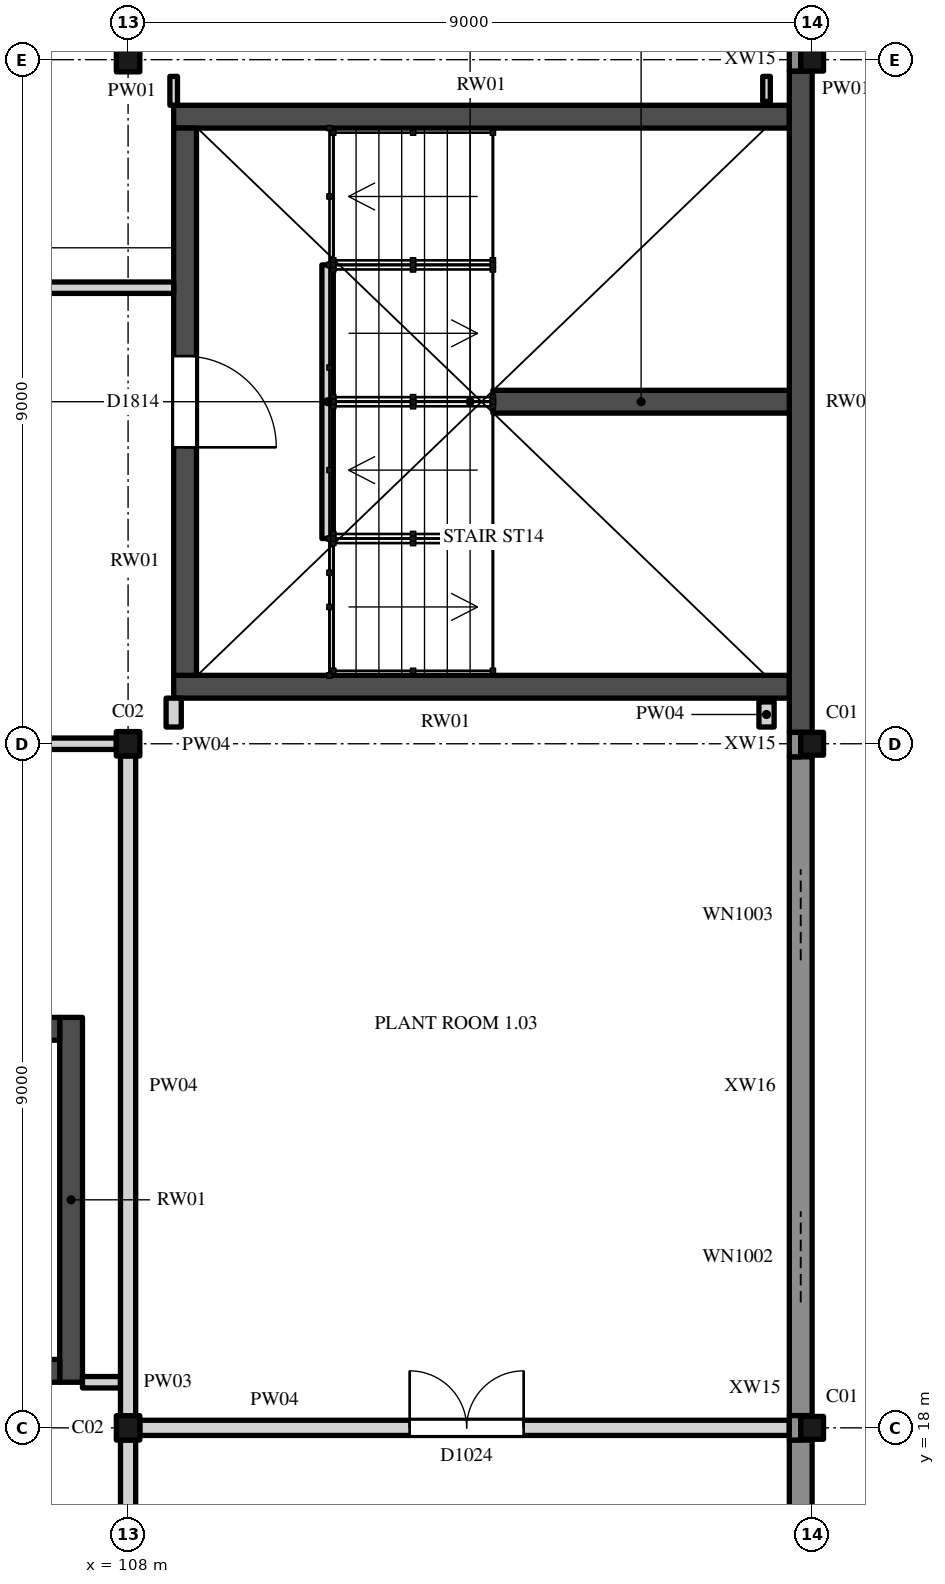
"""IFC4 building model, lengths in metres.
Left out: names, types, materials, properties, quantities, classifications, styles, units other than length and angle.
Written with IfcOpenShell. Run it as: python <this file> out.ifc"""

import sys

from ifc_helpers import new_model, si_unit, direction, frame, frame_2d, origin, origin_2d, place, context, subcontext, project, spatial, rectangle, hollow_rectangle, i_section, extrude, element, fill, save


model = new_model("IFC4")
c1 = context("Model", 3, precision=1e-05, world=origin(), true_north=direction((0.0, 1.0)))
c2 = subcontext(c1, "Body", "Model", "MODEL_VIEW")
j1 = project(units=[si_unit("LENGTHUNIT", "METRE"), si_unit("PLANEANGLEUNIT", "RADIAN")], contexts=[c1])
p1 = place(None, origin())
s1 = spatial("IfcSite", under=j1, at=p1, CompositionType="ELEMENT")
p2 = place(p1, origin())
s2 = spatial("IfcBuilding", under=s1, at=p2, CompositionType="ELEMENT")
p3 = place(p2, frame((0.0, 0.0, 6.0)))
s3 = spatial("IfcBuildingStorey", under=s2, at=p3, CompositionType="ELEMENT", Elevation=6.0)
p4 = place(p3, frame((108.0, 18.0, 0.0), z_axis=(0.0, 0.0, 1.0), x_axis=(1.0, 0.0, 0.0)))
e1 = element("IfcColumn", 1, at=p4, inside=s3, PredefinedType="COLUMN", context=c2, shape_type="SweptSolid", body=[
    extrude(i_section(OverallWidth=0.309, OverallDepth=0.321, WebThickness=0.014, FlangeThickness=0.022, FilletRadius=0.017, at=origin_2d()), origin(), (0.0, 0.0, 1.0), 5.0),
])
p5 = place(p3, frame((117.0, 18.0, 0.0), z_axis=(0.0, 0.0, 1.0), x_axis=(1.0, 0.0, 0.0)))
e2 = element("IfcColumn", 2, at=p5, inside=s3, PredefinedType="COLUMN", context=c2, shape_type="SweptSolid", body=[
    extrude(hollow_rectangle(XDim=0.3, YDim=0.3, WallThickness=0.012, InnerFilletRadius=0.019, OuterFilletRadius=0.031, at=origin_2d()), origin(), (0.0, 0.0, 1.0), 5.0),
])
p6 = place(p3, frame((108.0, 27.0, 0.0), z_axis=(0.0, 0.0, 1.0), x_axis=(1.0, 0.0, 0.0)))
e3 = element("IfcColumn", 3, at=p6, inside=s3, PredefinedType="COLUMN", context=c2, shape_type="SweptSolid", body=[
    extrude(i_section(OverallWidth=0.309, OverallDepth=0.321, WebThickness=0.014, FlangeThickness=0.022, FilletRadius=0.017, at=origin_2d()), origin(), (0.0, 0.0, 1.0), 5.0),
])
p7 = place(p3, frame((117.0, 27.0, 0.0), z_axis=(0.0, 0.0, 1.0), x_axis=(1.0, 0.0, 0.0)))
e4 = element("IfcColumn", 4, at=p7, inside=s3, PredefinedType="COLUMN", context=c2, shape_type="SweptSolid", body=[
    extrude(hollow_rectangle(XDim=0.3, YDim=0.3, WallThickness=0.012, InnerFilletRadius=0.019, OuterFilletRadius=0.031, at=origin_2d()), origin(), (0.0, 0.0, 1.0), 5.0),
])
p8 = place(p3, frame((108.0, 36.0, 0.0), z_axis=(0.0, 0.0, 1.0), x_axis=(1.0, 0.0, 0.0)))
e5 = element("IfcColumn", 5, at=p8, inside=s3, PredefinedType="COLUMN", context=c2, shape_type="SweptSolid", body=[
    extrude(i_section(OverallWidth=0.309, OverallDepth=0.321, WebThickness=0.014, FlangeThickness=0.022, FilletRadius=0.017, at=origin_2d()), origin(), (0.0, 0.0, 1.0), 5.0),
])
p9 = place(p3, frame((117.0, 36.0, 0.0), z_axis=(0.0, 0.0, 1.0), x_axis=(1.0, 0.0, 0.0)))
e6 = element("IfcColumn", 6, at=p9, inside=s3, PredefinedType="COLUMN", context=c2, shape_type="SweptSolid", body=[
    extrude(hollow_rectangle(XDim=0.3, YDim=0.3, WallThickness=0.012, InnerFilletRadius=0.019, OuterFilletRadius=0.031, at=origin_2d()), origin(), (0.0, 0.0, 1.0), 5.0),
])
for number, where, z_axis, x_axis in (
    (7, (108.6, 27.75, 0.0), (0.0, 0.0, 1.0), (1.0, 0.0, 0.0)),
    (8, (108.6, 35.25, 0.0), (0.0, 0.0, 1.0), (1.0, 0.0, 0.0)),
):
    element("IfcWall", number, at=place(p3, frame(where, z_axis=z_axis, x_axis=x_axis)), inside=s3, PredefinedType="SHEAR", context=c2, shape_type="SweptSolid", body=[
        extrude(rectangle(XDim=8.1, YDim=0.3, at=frame_2d((4.05, 0.0))), origin(), (0.0, 0.0, 1.0), 5.0),
    ])
p10 = place(p3, frame((108.75, 27.9, 0.0), z_axis=(0.0, 0.0, 1.0), x_axis=(0.0, 1.0, 0.0)))
e9 = element("IfcWall", 9, at=p10, inside=s3, PredefinedType="SHEAR", context=c2, shape_type="SweptSolid", body=[
    extrude(rectangle(XDim=7.2, YDim=0.3, at=frame_2d((3.6, 0.0))), origin(), (0.0, 0.0, 1.0), 5.0),
])
p11 = place(p10, frame((3.0, 0.0, 0.0)))
e10 = element("IfcOpeningElement", 10, at=p11, cuts=e9, PredefinedType="OPENING", context=c2, shape_type="SweptSolid", body=[
    extrude(rectangle(XDim=1.2, YDim=2.1, at=frame_2d((0.6, 1.05))), frame((0.0, 0.16, 0.0), z_axis=(0.0, -1.0, 0.0), x_axis=(1.0, 0.0, 0.0)), (0.0, 0.0, 1.0), 0.32),
])
p12 = place(p3, frame((116.85, 27.15, 0.0), z_axis=(0.0, 0.0, 1.0), x_axis=(0.0, 1.0, 0.0)))
e11 = element("IfcWall", 11, at=p12, inside=s3, PredefinedType="SHEAR", context=c2, shape_type="SweptSolid", body=[
    extrude(rectangle(XDim=8.7, YDim=0.3, at=frame_2d((4.35, 0.0))), origin(), (0.0, 0.0, 1.0), 5.0),
])
p13 = place(p3, frame((112.8, 31.5, 0.0), z_axis=(0.0, 0.0, 1.0), x_axis=(1.0, 0.0, 0.0)))
e12 = element("IfcWall", 12, at=p13, inside=s3, PredefinedType="SHEAR", context=c2, shape_type="SweptSolid", body=[
    extrude(rectangle(XDim=3.9, YDim=0.3, at=frame_2d((1.95, 0.0))), origin(), (0.0, 0.0, 1.0), 5.0),
])
p14 = place(p3, frame((110.625, 29.7, 0.0), z_axis=(0.0, 0.0, 1.0), x_axis=(0.0, 1.0, 0.0)))
e13 = element("IfcWall", 13, at=p14, inside=s3, PredefinedType="STANDARD", context=c2, shape_type="SweptSolid", body=[
    extrude(rectangle(XDim=3.6, YDim=0.15, at=frame_2d((1.8, 0.0))), origin(), (0.0, 0.0, 1.0), 2.3),
])
p15 = place(p3, frame((107.25, 18.6, 0.0), z_axis=(0.0, 0.0, 1.0), x_axis=(0.0, 1.0, 0.0)))
e14 = element("IfcWall", 14, at=p15, inside=s3, PredefinedType="SHEAR", context=c2, shape_type="SweptSolid", body=[
    extrude(rectangle(XDim=4.8, YDim=0.3, at=frame_2d((2.4, 0.0))), origin(), (0.0, 0.0, 1.0), 5.0),
])
p16 = place(p3, frame((103.65, 18.75, 0.0), z_axis=(0.0, 0.0, 1.0), x_axis=(1.0, 0.0, 0.0)))
e15 = element("IfcWall", 15, at=p16, inside=s3, PredefinedType="SHEAR", context=c2, shape_type="SweptSolid", body=[
    extrude(rectangle(XDim=3.45, YDim=0.3, at=frame_2d((1.725, 0.0))), origin(), (0.0, 0.0, 1.0), 5.0),
])
p17 = place(p16, frame((0.75, 0.0, 0.0)))
e16 = element("IfcOpeningElement", 16, at=p17, cuts=e15, PredefinedType="OPENING", context=c2, shape_type="SweptSolid", body=[
    extrude(rectangle(XDim=2.1, YDim=2.4, at=frame_2d((1.05, 1.2))), frame((0.0, 0.16, 0.0), z_axis=(0.0, -1.0, 0.0), x_axis=(1.0, 0.0, 0.0)), (0.0, 0.0, 1.0), 0.32),
])
p18 = place(p3, frame((103.65, 23.25, 0.0), z_axis=(0.0, 0.0, 1.0), x_axis=(1.0, 0.0, 0.0)))
e17 = element("IfcWall", 17, at=p18, inside=s3, PredefinedType="SHEAR", context=c2, shape_type="SweptSolid", body=[
    extrude(rectangle(XDim=3.45, YDim=0.3, at=frame_2d((1.725, 0.0))), origin(), (0.0, 0.0, 1.0), 5.0),
])
p19 = place(p3, frame((116.85, 9.172, 0.0), z_axis=(0.0, 0.0, 1.0), x_axis=(0.0, 1.0, 0.0)))
e18 = element("IfcWall", 18, at=p19, inside=s3, PredefinedType="SOLIDWALL", context=c2, shape_type="SweptSolid", body=[
    extrude(rectangle(XDim=8.667, YDim=0.3, at=frame_2d((4.333, 0.0))), origin(), (0.0, 0.0, 1.0), 4.297),
])
p20 = place(p19, frame((3.128, 0.0, 0.9)))
e19 = element("IfcOpeningElement", 19, at=p20, cuts=e18, PredefinedType="OPENING", context=c2, shape_type="SweptSolid", body=[
    extrude(rectangle(XDim=2.4, YDim=1.8, at=frame_2d((1.2, 0.9))), frame((0.0, 0.16, 0.0), z_axis=(0.0, -1.0, 0.0), x_axis=(1.0, 0.0, 0.0)), (0.0, 0.0, 1.0), 0.32),
])
p21 = place(p3, frame((116.85, 18.161, 0.0), z_axis=(0.0, 0.0, 1.0), x_axis=(0.0, 1.0, 0.0)))
e20 = element("IfcWall", 20, at=p21, inside=s3, PredefinedType="SOLIDWALL", context=c2, shape_type="SweptSolid", body=[
    extrude(rectangle(XDim=8.667, YDim=0.3, at=frame_2d((4.333, 0.0))), origin(), (0.0, 0.0, 1.0), 4.297),
])
p22 = place(p21, frame((1.489, 0.0, 1.2)))
e21 = element("IfcOpeningElement", 21, at=p22, cuts=e20, PredefinedType="OPENING", context=c2, shape_type="SweptSolid", body=[
    extrude(rectangle(XDim=1.2, YDim=1.5, at=frame_2d((0.6, 0.75))), frame((0.0, 0.16, 0.0), z_axis=(0.0, -1.0, 0.0), x_axis=(1.0, 0.0, 0.0)), (0.0, 0.0, 1.0), 0.32),
])
p23 = place(p21, frame((5.989, 0.0, 1.2)))
e22 = element("IfcOpeningElement", 22, at=p23, cuts=e20, PredefinedType="OPENING", context=c2, shape_type="SweptSolid", body=[
    extrude(rectangle(XDim=1.2, YDim=1.5, at=frame_2d((0.6, 0.75))), frame((0.0, 0.16, 0.0), z_axis=(0.0, -1.0, 0.0), x_axis=(1.0, 0.0, 0.0)), (0.0, 0.0, 1.0), 0.32),
])
p24 = place(p3, frame((116.775, 17.839, 0.0), z_axis=(0.0, 0.0, 1.0), x_axis=(0.0, 1.0, 0.0)))
e23 = element("IfcWall", 23, at=p24, inside=s3, PredefinedType="SOLIDWALL", context=c2, shape_type="SweptSolid", body=[
    extrude(rectangle(XDim=0.322, YDim=0.15, at=frame_2d((0.161, 0.0))), origin(), (0.0, 0.0, 1.0), 4.297),
])
for number, where, z_axis, x_axis in (
    (24, (116.775, 26.828, 0.0), (0.0, 0.0, 1.0), (0.0, 1.0, 0.0)),
    (25, (116.775, 35.85, 0.0), (0.0, 0.0, 1.0), (0.0, 1.0, 0.0)),
):
    element("IfcWall", number, at=place(p3, frame(where, z_axis=z_axis, x_axis=x_axis)), inside=s3, PredefinedType="SOLIDWALL", context=c2, shape_type="SweptSolid", body=[
        extrude(rectangle(XDim=0.322, YDim=0.15, at=frame_2d((0.161, 0.0))), origin(), (0.0, 0.0, 1.0), 5.0),
    ])
p25 = place(p3, frame((108.155, 18.0, 0.0), z_axis=(0.0, 0.0, 1.0), x_axis=(1.0, 0.0, 0.0)))
e26 = element("IfcWall", 26, at=p25, inside=s3, PredefinedType="PARTITIONING", context=c2, shape_type="SweptSolid", body=[
    extrude(rectangle(XDim=8.545, YDim=0.2, at=frame_2d((4.273, 0.0))), origin(), (0.0, 0.0, 1.0), 4.419),
])
p26 = place(p25, frame((3.55, 0.0, 0.0)))
e27 = element("IfcOpeningElement", 27, at=p26, cuts=e26, PredefinedType="OPENING", context=c2, shape_type="SweptSolid", body=[
    extrude(rectangle(XDim=1.5, YDim=2.4, at=frame_2d((0.75, 1.2))), frame((0.0, 0.11, 0.0), z_axis=(0.0, -1.0, 0.0), x_axis=(1.0, 0.0, 0.0)), (0.0, 0.0, 1.0), 0.22),
])
p27 = place(p3, frame((107.4, 18.6, 0.0), z_axis=(0.0, 0.0, 1.0), x_axis=(1.0, 0.0, 0.0)))
e28 = element("IfcWall", 28, at=p27, inside=s3, PredefinedType="PARTITIONING", context=c2, shape_type="SweptSolid", body=[
    extrude(rectangle(XDim=0.5, YDim=0.15, at=frame_2d((0.25, 0.0))), origin(), (0.0, 0.0, 1.0), 4.825),
])
p28 = place(p3, frame((99.155, 27.0, 0.0), z_axis=(0.0, 0.0, 1.0), x_axis=(1.0, 0.0, 0.0)))
e29 = element("IfcWall", 29, at=p28, inside=s3, PredefinedType="PARTITIONING", context=c2, shape_type="SweptSolid", body=[
    extrude(rectangle(XDim=8.691, YDim=0.15, at=frame_2d((4.345, 0.0))), origin(), (0.0, 0.0, 1.0), 4.419),
])
p29 = place(p28, frame((3.75, 0.0, 0.0)))
e30 = element("IfcOpeningElement", 30, at=p29, cuts=e29, PredefinedType="OPENING", context=c2, shape_type="SweptSolid", body=[
    extrude(rectangle(XDim=1.2, YDim=2.4, at=frame_2d((0.6, 1.2))), frame((0.0, 0.085, 0.0), z_axis=(0.0, -1.0, 0.0), x_axis=(1.0, 0.0, 0.0)), (0.0, 0.0, 1.0), 0.17),
])
p30 = place(p3, frame((74.925, 33.0, 0.0), z_axis=(0.0, 0.0, 1.0), x_axis=(1.0, 0.0, 0.0)))
e31 = element("IfcWall", 31, at=p30, inside=s3, PredefinedType="PARTITIONING", context=c2, shape_type="SweptSolid", body=[
    extrude(rectangle(XDim=33.675, YDim=0.15, at=frame_2d((16.837, 0.0))), origin(), (0.0, 0.0, 1.0), 4.419),
])
p31 = place(p30, frame((23.025, 0.0, 0.0)))
e32 = element("IfcOpeningElement", 32, at=p31, cuts=e31, PredefinedType="OPENING", context=c2, shape_type="SweptSolid", body=[
    extrude(rectangle(XDim=2.0, YDim=2.4, at=frame_2d((1.0, 1.2))), frame((0.0, 0.085, 0.0), z_axis=(0.0, -1.0, 0.0), x_axis=(1.0, 0.0, 0.0)), (0.0, 0.0, 1.0), 0.17),
])
p32 = place(p3, frame((108.0, 9.16, 0.0), z_axis=(0.0, 0.0, 1.0), x_axis=(0.0, 1.0, 0.0)))
e33 = element("IfcWall", 33, at=p32, inside=s3, PredefinedType="PARTITIONING", context=c2, shape_type="SweptSolid", body=[
    extrude(rectangle(XDim=8.679, YDim=0.2, at=frame_2d((4.34, 0.0))), origin(), (0.0, 0.0, 1.0), 4.297),
])
p33 = place(p32, frame((3.55, 0.0, 0.0)))
e34 = element("IfcOpeningElement", 34, at=p33, cuts=e33, PredefinedType="OPENING", context=c2, shape_type="SweptSolid", body=[
    extrude(rectangle(XDim=1.5, YDim=2.4, at=frame_2d((0.75, 1.2))), frame((0.0, 0.11, 0.0), z_axis=(0.0, -1.0, 0.0), x_axis=(1.0, 0.0, 0.0)), (0.0, 0.0, 1.0), 0.22),
])
p34 = place(p3, frame((108.0, 18.16, 0.0), z_axis=(0.0, 0.0, 1.0), x_axis=(0.0, 1.0, 0.0)))
e35 = element("IfcWall", 35, at=p34, inside=s3, PredefinedType="PARTITIONING", context=c2, shape_type="SweptSolid", body=[
    extrude(rectangle(XDim=8.679, YDim=0.2, at=frame_2d((4.34, 0.0))), origin(), (0.0, 0.0, 1.0), 4.297),
])
p35 = place(p3, frame((108.6, 27.22, 0.0), z_axis=(0.0, 0.0, 1.0), x_axis=(0.0, 1.0, 0.0)))
e36 = element("IfcWall", 36, at=p35, inside=s3, PredefinedType="PARTITIONING", context=c2, shape_type="SweptSolid", body=[
    extrude(rectangle(XDim=0.38, YDim=0.2, at=frame_2d((0.19, 0.0))), origin(), (0.0, 0.0, 1.0), 4.825),
])
p36 = place(p3, frame((108.6, 35.4, 0.0), z_axis=(0.0, 0.0, 1.0), x_axis=(0.0, 1.0, 0.0)))
e37 = element("IfcWall", 37, at=p36, inside=s3, PredefinedType="PARTITIONING", context=c2, shape_type="SweptSolid", body=[
    extrude(rectangle(XDim=0.38, YDim=0.1, at=frame_2d((0.19, 0.0))), origin(), (0.0, 0.0, 1.0), 4.825),
])
p37 = place(p3, frame((116.4, 27.22, 0.0), z_axis=(0.0, 0.0, 1.0), x_axis=(0.0, 1.0, 0.0)))
e38 = element("IfcWall", 38, at=p37, inside=s3, PredefinedType="PARTITIONING", context=c2, shape_type="SweptSolid", body=[
    extrude(rectangle(XDim=0.33, YDim=0.2, at=frame_2d((0.165, 0.0))), origin(), (0.0, 0.0, 1.0), 4.825),
])
p38 = place(p3, frame((116.4, 35.45, 0.0), z_axis=(0.0, 0.0, 1.0), x_axis=(0.0, 1.0, 0.0)))
e39 = element("IfcWall", 39, at=p38, inside=s3, PredefinedType="PARTITIONING", context=c2, shape_type="SweptSolid", body=[
    extrude(rectangle(XDim=0.33, YDim=0.1, at=frame_2d((0.165, 0.0))), origin(), (0.0, 0.0, 1.0), 4.825),
])
p39 = place(p11, origin())
e40 = element("IfcDoor", 40, at=p39, inside=s3, OperationType="SINGLE_SWING_LEFT", PredefinedType="DOOR", context=c2, shape_type="SweptSolid", body=[
    extrude(rectangle(XDim=1.2, YDim=2.1, at=frame_2d((0.6, 1.05))), frame((0.0, 0.025, 0.0), z_axis=(0.0, -1.0, 0.0), x_axis=(1.0, 0.0, 0.0)), (0.0, 0.0, 1.0), 0.05),
])
fill(e10, e40)
p40 = place(p22, origin())
e41 = element("IfcWindow", 41, at=p40, inside=s3, PartitioningType="SINGLE_PANEL", PredefinedType="WINDOW", context=c2, shape_type="SweptSolid", body=[
    extrude(rectangle(XDim=1.2, YDim=1.5, at=frame_2d((0.6, 0.75))), frame((0.0, 0.03, 0.0), z_axis=(0.0, -1.0, 0.0), x_axis=(1.0, 0.0, 0.0)), (0.0, 0.0, 1.0), 0.06),
])
fill(e21, e41)
p41 = place(p23, origin())
e42 = element("IfcWindow", 42, at=p41, inside=s3, PartitioningType="SINGLE_PANEL", PredefinedType="WINDOW", context=c2, shape_type="SweptSolid", body=[
    extrude(rectangle(XDim=1.2, YDim=1.5, at=frame_2d((0.6, 0.75))), frame((0.0, 0.03, 0.0), z_axis=(0.0, -1.0, 0.0), x_axis=(1.0, 0.0, 0.0)), (0.0, 0.0, 1.0), 0.06),
])
fill(e22, e42)
p42 = place(p26, origin())
e43 = element("IfcDoor", 43, at=p42, inside=s3, OperationType="DOUBLE_DOOR_SINGLE_SWING", PredefinedType="DOOR", context=c2, shape_type="SweptSolid", body=[
    extrude(rectangle(XDim=1.5, YDim=2.4, at=frame_2d((0.75, 1.2))), frame((0.0, 0.025, 0.0), z_axis=(0.0, -1.0, 0.0), x_axis=(1.0, 0.0, 0.0)), (0.0, 0.0, 1.0), 0.05),
])
fill(e27, e43)
save(model, sys.argv[1])
